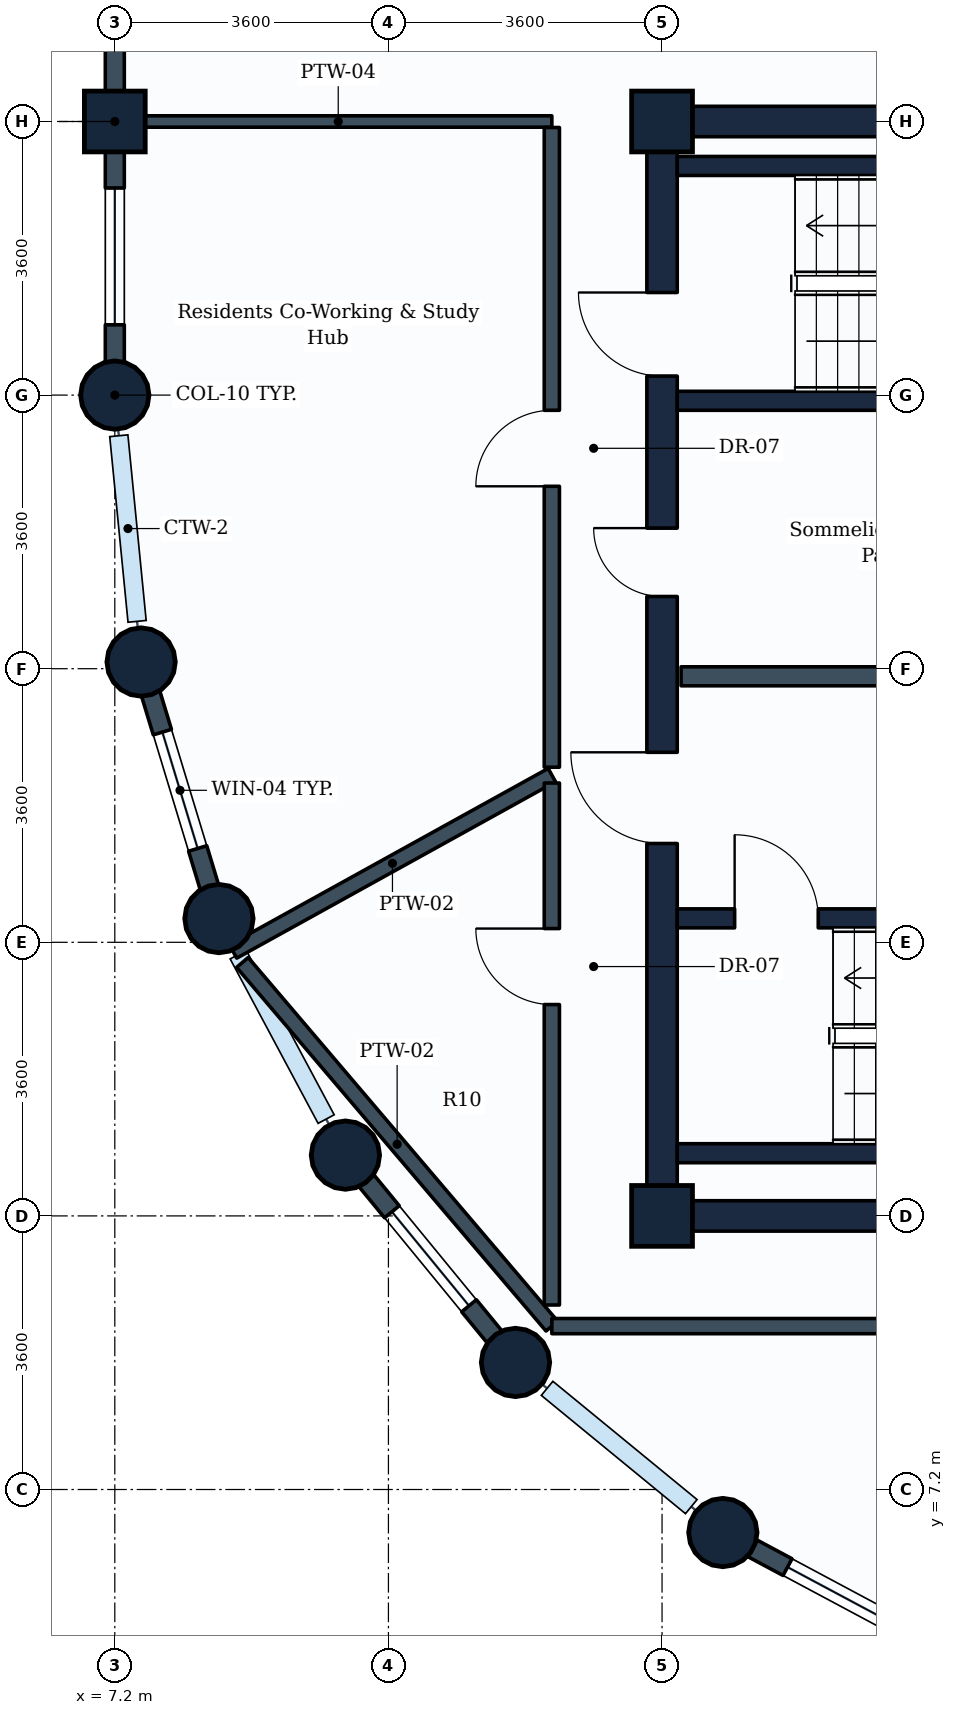
"""IFC4 building model, lengths in metres.
Left out: names, types, materials, properties, quantities, classifications, styles, units other than length and angle.
Written with IfcOpenShell. Run it as: python <this file> out.ifc"""

import sys

from ifc_helpers import new_model, si_unit, direction, frame, frame_2d, origin, origin_2d, place, context, subcontext, project, spatial, rectangle, circle, extrude, element, fill, save


model = new_model("IFC4")
c1 = context("Model", 3, precision=1e-05, world=origin(), true_north=direction((0.0, 1.0)))
c2 = subcontext(c1, "Body", "Model", "MODEL_VIEW")
j1 = project(units=[si_unit("LENGTHUNIT", "METRE"), si_unit("PLANEANGLEUNIT", "RADIAN")], contexts=[c1])
p1 = place(None, origin())
s1 = spatial("IfcSite", under=j1, at=p1, CompositionType="ELEMENT")
p2 = place(p1, origin())
s2 = spatial("IfcBuilding", under=s1, at=p2, CompositionType="ELEMENT")
p3 = place(p2, frame((0.0, 0.0, 273.8)))
s3 = spatial("IfcBuildingStorey", under=s2, at=p3, CompositionType="ELEMENT", Elevation=273.8)
p4 = place(p3, frame((7.2, 21.6, 0.0), z_axis=(0.0, 0.0, 1.0), x_axis=(1.0, 0.0, 0.0)))
e1 = element("IfcColumn", 1, at=p4, inside=s3, PredefinedType="COLUMN", context=c2, shape_type="SweptSolid", body=[
    extrude(circle(Radius=0.45, at=origin_2d()), origin(), (0.0, 0.0, 1.0), 3.6),
])
p5 = place(p3, frame((7.2, 25.2, 0.0), z_axis=(0.0, 0.0, 1.0), x_axis=(0.0, 1.0, 0.0)))
e2 = element("IfcColumn", 2, at=p5, inside=s3, PredefinedType="COLUMN", context=c2, shape_type="SweptSolid", body=[
    extrude(rectangle(XDim=0.8, YDim=0.8, at=origin_2d()), origin(), (0.0, 0.0, 1.0), 3.6),
])
for number, where, z_axis, x_axis in (
    (3, (7.546, 18.088, 0.0), (0.0, 0.0, 1.0), (1.0, 0.0, 0.0)),
    (4, (8.57, 14.712, 0.0), (0.0, 0.0, 1.0), (1.0, 0.0, 0.0)),
    (5, (10.234, 11.6, 0.0), (0.0, 0.0, 1.0), (1.0, 0.0, 0.0)),
    (6, (12.472, 8.872, 0.0), (0.0, 0.0, 1.0), (1.0, 0.0, 0.0)),
):
    element("IfcColumn", number, at=place(p3, frame(where, z_axis=z_axis, x_axis=x_axis)), inside=s3, PredefinedType="COLUMN", context=c2, shape_type="SweptSolid", body=[
        extrude(circle(Radius=0.45, at=origin_2d()), origin(), (0.0, 0.0, 1.0), 3.6),
    ])
for number, where, z_axis, x_axis in (
    (7, (14.4, 10.8, 0.0), (0.0, 0.0, 1.0), (1.0, 0.0, 0.0)),
    (8, (14.4, 25.2, 0.0), (0.0, 0.0, 1.0), (1.0, 0.0, 0.0)),
):
    element("IfcColumn", number, at=place(p3, frame(where, z_axis=z_axis, x_axis=x_axis)), inside=s3, PredefinedType="COLUMN", context=c2, shape_type="SweptSolid", body=[
        extrude(rectangle(XDim=0.8, YDim=0.8, at=origin_2d()), origin(), (0.0, 0.0, 1.0), 3.6),
    ])
p6 = place(p3, frame((15.2, 6.634, 0.0), z_axis=(0.0, 0.0, 1.0), x_axis=(1.0, 0.0, 0.0)))
e9 = element("IfcColumn", 9, at=p6, inside=s3, PredefinedType="COLUMN", context=c2, shape_type="SweptSolid", body=[
    extrude(circle(Radius=0.45, at=origin_2d()), origin(), (0.0, 0.0, 1.0), 3.6),
])
p7 = place(p3, frame((7.2, 25.2, 0.0), z_axis=(0.0, 0.0, 1.0), x_axis=(0.0, 1.0, 0.0)))
e10 = element("IfcWall", 10, at=p7, inside=s3, PredefinedType="STANDARD", context=c2, shape_type="SweptSolid", body=[
    extrude(rectangle(XDim=3.6, YDim=0.25, at=frame_2d((1.8, 0.0))), origin(), (0.0, 0.0, 1.0), 2.83),
])
p8 = place(p3, frame((7.2, 21.6, 0.0), z_axis=(0.0, 0.0, 1.0), x_axis=(0.0, 1.0, 0.0)))
e11 = element("IfcWall", 11, at=p8, inside=s3, PredefinedType="STANDARD", context=c2, shape_type="SweptSolid", body=[
    extrude(rectangle(XDim=3.6, YDim=0.25, at=frame_2d((1.8, 0.0))), origin(), (0.0, 0.0, 1.0), 2.83),
])
p9 = place(p8, frame((0.925, 0.0, 0.85)))
e12 = element("IfcOpeningElement", 12, at=p9, cuts=e11, PredefinedType="OPENING", context=c2, shape_type="SweptSolid", body=[
    extrude(rectangle(XDim=1.8, YDim=1.35, at=frame_2d((0.9, 0.675))), frame((0.0, 0.135, 0.0), z_axis=(0.0, -1.0, 0.0), x_axis=(1.0, 0.0, 0.0)), (0.0, 0.0, 1.0), 0.27),
])
p10 = place(p3, frame((8.57, 14.712, 0.0), z_axis=(0.0, 0.0, 1.0), x_axis=(-0.290305086481, 0.956934144423, 0.0)))
e13 = element("IfcWall", 13, at=p10, inside=s3, PredefinedType="STANDARD", context=c2, shape_type="SweptSolid", body=[
    extrude(rectangle(XDim=3.528, YDim=0.25, at=frame_2d((1.764, 0.0))), origin(), (0.0, 0.0, 1.0), 2.83),
])
p11 = place(p10, frame((0.964, 0.0, 0.85)))
e14 = element("IfcOpeningElement", 14, at=p11, cuts=e13, PredefinedType="OPENING", context=c2, shape_type="SweptSolid", body=[
    extrude(rectangle(XDim=1.6, YDim=1.35, at=frame_2d((0.8, 0.675))), frame((0.0, 0.135, 0.0), z_axis=(0.0, -1.0, 0.0), x_axis=(1.0, 0.0, 0.0)), (0.0, 0.0, 1.0), 0.27),
])
p12 = place(p3, frame((12.472, 8.872, 0.0), z_axis=(0.0, 0.0, 1.0), x_axis=(-0.634258295121, 0.773121216285, 0.0)))
e15 = element("IfcWall", 15, at=p12, inside=s3, PredefinedType="STANDARD", context=c2, shape_type="SweptSolid", body=[
    extrude(rectangle(XDim=3.529, YDim=0.25, at=frame_2d((1.764, 0.0))), origin(), (0.0, 0.0, 1.0), 2.83),
])
p13 = place(p12, frame((0.964, 0.0, 0.85)))
e16 = element("IfcOpeningElement", 16, at=p13, cuts=e15, PredefinedType="OPENING", context=c2, shape_type="SweptSolid", body=[
    extrude(rectangle(XDim=1.6, YDim=1.35, at=frame_2d((0.8, 0.675))), frame((0.0, 0.135, 0.0), z_axis=(0.0, -1.0, 0.0), x_axis=(1.0, 0.0, 0.0)), (0.0, 0.0, 1.0), 0.27),
])
p14 = place(p3, frame((18.312, 4.97, 0.0), z_axis=(0.0, 0.0, 1.0), x_axis=(-0.881846862014, 0.471535907389, 0.0)))
e17 = element("IfcWall", 17, at=p14, inside=s3, PredefinedType="STANDARD", context=c2, shape_type="SweptSolid", body=[
    extrude(rectangle(XDim=3.529, YDim=0.25, at=frame_2d((1.765, 0.0))), origin(), (0.0, 0.0, 1.0), 2.83),
])
p15 = place(p14, frame((0.964, 0.0, 0.85)))
e18 = element("IfcOpeningElement", 18, at=p15, cuts=e17, PredefinedType="OPENING", context=c2, shape_type="SweptSolid", body=[
    extrude(rectangle(XDim=1.6, YDim=1.35, at=frame_2d((0.8, 0.675))), frame((0.0, 0.135, 0.0), z_axis=(0.0, -1.0, 0.0), x_axis=(1.0, 0.0, 0.0)), (0.0, 0.0, 1.0), 0.27),
])
p16 = place(p3, frame((14.4, 10.8, 0.0), z_axis=(0.0, 0.0, 1.0), x_axis=(1.0, 0.0, 0.0)))
e19 = element("IfcWall", 19, at=p16, inside=s3, PredefinedType="SHEAR", context=c2, shape_type="SweptSolid", body=[
    extrude(rectangle(XDim=18.0, YDim=0.4, at=frame_2d((9.0, 0.0))), origin(), (0.0, 0.0, 1.0), 3.35),
])
p17 = place(p3, frame((14.4, 25.2, 0.0), z_axis=(0.0, 0.0, 1.0), x_axis=(1.0, 0.0, 0.0)))
e20 = element("IfcWall", 20, at=p17, inside=s3, PredefinedType="SHEAR", context=c2, shape_type="SweptSolid", body=[
    extrude(rectangle(XDim=10.8, YDim=0.4, at=frame_2d((5.4, 0.0))), origin(), (0.0, 0.0, 1.0), 3.35),
])
p18 = place(p3, frame((14.4, 10.8, 0.0), z_axis=(0.0, 0.0, 1.0), x_axis=(0.0, 1.0, 0.0)))
e21 = element("IfcWall", 21, at=p18, inside=s3, PredefinedType="SHEAR", context=c2, shape_type="SweptSolid", body=[
    extrude(rectangle(XDim=14.4, YDim=0.4, at=frame_2d((7.2, 0.0))), origin(), (0.0, 0.0, 1.0), 3.35),
])
p19 = place(p18, frame((11.05, 0.0, 0.0)))
e22 = element("IfcOpeningElement", 22, at=p19, cuts=e21, PredefinedType="OPENING", context=c2, shape_type="SweptSolid", body=[
    extrude(rectangle(XDim=1.1, YDim=2.1, at=frame_2d((0.55, 1.05))), frame((0.0, 0.21, 0.0), z_axis=(0.0, -1.0, 0.0), x_axis=(1.0, 0.0, 0.0)), (0.0, 0.0, 1.0), 0.42),
])
p20 = place(p18, frame((4.9, 0.0, 0.0)))
e23 = element("IfcOpeningElement", 23, at=p20, cuts=e21, PredefinedType="OPENING", context=c2, shape_type="SweptSolid", body=[
    extrude(rectangle(XDim=1.2, YDim=2.1, at=frame_2d((0.6, 1.05))), frame((0.0, 0.21, 0.0), z_axis=(0.0, -1.0, 0.0), x_axis=(1.0, 0.0, 0.0)), (0.0, 0.0, 1.0), 0.42),
])
p21 = place(p18, frame((8.15, 0.0, 0.0)))
e24 = element("IfcOpeningElement", 24, at=p21, cuts=e21, PredefinedType="OPENING", context=c2, shape_type="SweptSolid", body=[
    extrude(rectangle(XDim=0.9, YDim=2.1, at=frame_2d((0.45, 1.05))), frame((0.0, 0.21, 0.0), z_axis=(0.0, -1.0, 0.0), x_axis=(1.0, 0.0, 0.0)), (0.0, 0.0, 1.0), 0.42),
])
p22 = place(p3, frame((14.6, 11.625, 0.0), z_axis=(0.0, 0.0, 1.0), x_axis=(1.0, 0.0, 0.0)))
e25 = element("IfcWall", 25, at=p22, inside=s3, PredefinedType="SHEAR", context=c2, shape_type="SweptSolid", body=[
    extrude(rectangle(XDim=8.75, YDim=0.25, at=frame_2d((4.375, 0.0))), origin(), (0.0, 0.0, 1.0), 3.35),
])
p23 = place(p3, frame((14.6, 14.715, 0.0), z_axis=(0.0, 0.0, 1.0), x_axis=(1.0, 0.0, 0.0)))
e26 = element("IfcWall", 26, at=p23, inside=s3, PredefinedType="SHEAR", context=c2, shape_type="SweptSolid", body=[
    extrude(rectangle(XDim=8.75, YDim=0.25, at=frame_2d((4.375, 0.0))), origin(), (0.0, 0.0, 1.0), 3.35),
])
p24 = place(p23, frame((0.755, 0.0, 0.0)))
e27 = element("IfcOpeningElement", 27, at=p24, cuts=e26, PredefinedType="OPENING", context=c2, shape_type="SweptSolid", body=[
    extrude(rectangle(XDim=1.1, YDim=2.1, at=frame_2d((0.55, 1.05))), frame((0.0, 0.135, 0.0), z_axis=(0.0, -1.0, 0.0), x_axis=(1.0, 0.0, 0.0)), (0.0, 0.0, 1.0), 0.27),
])
for number, where, z_axis, x_axis in (
    (28, (14.6, 21.525, 0.0), (0.0, 0.0, 1.0), (1.0, 0.0, 0.0)),
    (29, (14.6, 24.615, 0.0), (0.0, 0.0, 1.0), (1.0, 0.0, 0.0)),
):
    element("IfcWall", number, at=place(p3, frame(where, z_axis=z_axis, x_axis=x_axis)), inside=s3, PredefinedType="SHEAR", context=c2, shape_type="SweptSolid", body=[
        extrude(rectangle(XDim=8.3, YDim=0.25, at=frame_2d((4.15, 0.0))), origin(), (0.0, 0.0, 1.0), 3.35),
    ])
p25 = place(p3, frame((14.65, 17.9, 0.0), z_axis=(0.0, 0.0, 1.0), x_axis=(1.0, 0.0, 0.0)))
e30 = element("IfcWall", 30, at=p25, inside=s3, PredefinedType="PARTITIONING", context=c2, shape_type="SweptSolid", body=[
    extrude(rectangle(XDim=7.15, YDim=0.25, at=frame_2d((3.575, 0.0))), origin(), (0.0, 0.0, 1.0), 3.335),
])
p26 = place(p3, frame((7.329, 25.2, 0.0), z_axis=(0.0, 0.0, 1.0), x_axis=(1.0, 0.0, 0.0)))
e31 = element("IfcWall", 31, at=p26, inside=s3, PredefinedType="PARTITIONING", context=c2, shape_type="SweptSolid", body=[
    extrude(rectangle(XDim=5.621, YDim=0.15, at=frame_2d((2.811, 0.0))), origin(), (0.0, 0.0, 1.0), 3.335),
])
p27 = place(p3, frame((12.95, 9.35, 0.0), z_axis=(0.0, 0.0, 1.0), x_axis=(-0.648005936971, 0.76163528388, 0.0)))
e32 = element("IfcWall", 32, at=p27, inside=s3, PredefinedType="PARTITIONING", context=c2, shape_type="SweptSolid", body=[
    extrude(rectangle(XDim=6.282, YDim=0.2, at=frame_2d((3.141, 0.0))), origin(), (0.0, 0.0, 1.0), 2.83),
])
p28 = place(p3, frame((12.95, 16.6, 0.0), z_axis=(0.0, 0.0, 1.0), x_axis=(-0.874941762978, -0.484228160475, 0.0)))
e33 = element("IfcWall", 33, at=p28, inside=s3, PredefinedType="PARTITIONING", context=c2, shape_type="SweptSolid", body=[
    extrude(rectangle(XDim=4.793, YDim=0.2, at=frame_2d((2.396, 0.0))), origin(), (0.0, 0.0, 1.0), 2.83),
])
p29 = place(p3, frame((12.95, 16.704, 0.0), z_axis=(0.0, 0.0, 1.0), x_axis=(0.0, 1.0, 0.0)))
e34 = element("IfcWall", 34, at=p29, inside=s3, PredefinedType="PARTITIONING", context=c2, shape_type="SweptSolid", body=[
    extrude(rectangle(XDim=8.417, YDim=0.2, at=frame_2d((4.208, 0.0))), origin(), (0.0, 0.0, 1.0), 3.02),
])
p30 = place(p29, frame((3.696, 0.0, 0.0)))
e35 = element("IfcOpeningElement", 35, at=p30, cuts=e34, PredefinedType="OPENING", context=c2, shape_type="SweptSolid", body=[
    extrude(rectangle(XDim=1.0, YDim=2.1, at=frame_2d((0.5, 1.05))), frame((0.0, 0.11, 0.0), z_axis=(0.0, -1.0, 0.0), x_axis=(1.0, 0.0, 0.0)), (0.0, 0.0, 1.0), 0.22),
])
p31 = place(p3, frame((12.95, 9.628, 0.0), z_axis=(0.0, 0.0, 1.0), x_axis=(0.0, 1.0, 0.0)))
e36 = element("IfcWall", 36, at=p31, inside=s3, PredefinedType="PARTITIONING", context=c2, shape_type="SweptSolid", body=[
    extrude(rectangle(XDim=6.868, YDim=0.2, at=frame_2d((3.434, 0.0))), origin(), (0.0, 0.0, 1.0), 3.03),
])
p32 = place(p31, frame((3.953, 0.0, 0.0)))
e37 = element("IfcOpeningElement", 37, at=p32, cuts=e36, PredefinedType="OPENING", context=c2, shape_type="SweptSolid", body=[
    extrude(rectangle(XDim=1.0, YDim=2.1, at=frame_2d((0.5, 1.05))), frame((0.0, 0.11, 0.0), z_axis=(0.0, -1.0, 0.0), x_axis=(1.0, 0.0, 0.0)), (0.0, 0.0, 1.0), 0.22),
])
p33 = place(p3, frame((12.95, 9.35, 0.0), z_axis=(0.0, 0.0, 1.0), x_axis=(1.0, 0.0, 0.0)))
e38 = element("IfcWall", 38, at=p33, inside=s3, PredefinedType="PARTITIONING", context=c2, shape_type="SweptSolid", body=[
    extrude(rectangle(XDim=15.771, YDim=0.2, at=frame_2d((7.885, 0.0))), origin(), (0.0, 0.0, 1.0), 3.02),
])
p34 = place(p33, frame((4.836, 0.0, 0.0)))
e39 = element("IfcOpeningElement", 39, at=p34, cuts=e38, PredefinedType="OPENING", context=c2, shape_type="SweptSolid", body=[
    extrude(rectangle(XDim=1.0, YDim=2.1, at=frame_2d((0.5, 1.05))), frame((0.0, 0.11, 0.0), z_axis=(0.0, -1.0, 0.0), x_axis=(1.0, 0.0, 0.0)), (0.0, 0.0, 1.0), 0.22),
])
p35 = place(p9, origin())
e40 = element("IfcWindow", 40, at=p35, inside=s3, PartitioningType="SINGLE_PANEL", PredefinedType="WINDOW", context=c2, shape_type="SweptSolid", body=[
    extrude(rectangle(XDim=1.8, YDim=1.35, at=frame_2d((0.9, 0.675))), frame((0.0, 0.03, 0.0), z_axis=(0.0, -1.0, 0.0), x_axis=(1.0, 0.0, 0.0)), (0.0, 0.0, 1.0), 0.06),
])
fill(e12, e40)
p36 = place(p11, origin())
e41 = element("IfcWindow", 41, at=p36, inside=s3, PartitioningType="SINGLE_PANEL", PredefinedType="WINDOW", context=c2, shape_type="SweptSolid", body=[
    extrude(rectangle(XDim=1.6, YDim=1.35, at=frame_2d((0.8, 0.675))), frame((0.0, 0.03, 0.0), z_axis=(0.0, -1.0, 0.0), x_axis=(1.0, 0.0, 0.0)), (0.0, 0.0, 1.0), 0.06),
])
fill(e14, e41)
p37 = place(p13, origin())
e42 = element("IfcWindow", 42, at=p37, inside=s3, PartitioningType="SINGLE_PANEL", PredefinedType="WINDOW", context=c2, shape_type="SweptSolid", body=[
    extrude(rectangle(XDim=1.6, YDim=1.35, at=frame_2d((0.8, 0.675))), frame((0.0, 0.03, 0.0), z_axis=(0.0, -1.0, 0.0), x_axis=(1.0, 0.0, 0.0)), (0.0, 0.0, 1.0), 0.06),
])
fill(e16, e42)
p38 = place(p15, origin())
e43 = element("IfcWindow", 43, at=p38, inside=s3, PartitioningType="SINGLE_PANEL", PredefinedType="WINDOW", context=c2, shape_type="SweptSolid", body=[
    extrude(rectangle(XDim=1.6, YDim=1.35, at=frame_2d((0.8, 0.675))), frame((0.0, 0.03, 0.0), z_axis=(0.0, -1.0, 0.0), x_axis=(1.0, 0.0, 0.0)), (0.0, 0.0, 1.0), 0.06),
])
fill(e18, e43)
p39 = place(p24, origin())
e44 = element("IfcDoor", 44, at=p39, inside=s3, OperationType="SINGLE_SWING_LEFT", PredefinedType="DOOR", context=c2, shape_type="SweptSolid", body=[
    extrude(rectangle(XDim=1.1, YDim=2.1, at=frame_2d((0.55, 1.05))), frame((0.0, 0.025, 0.0), z_axis=(0.0, -1.0, 0.0), x_axis=(1.0, 0.0, 0.0)), (0.0, 0.0, 1.0), 0.05),
])
fill(e27, e44)
p40 = place(p19, origin())
e45 = element("IfcDoor", 45, at=p40, inside=s3, OperationType="SINGLE_SWING_RIGHT", PredefinedType="DOOR", context=c2, shape_type="SweptSolid", body=[
    extrude(rectangle(XDim=1.1, YDim=2.1, at=frame_2d((0.55, 1.05))), frame((0.0, 0.025, 0.0), z_axis=(0.0, -1.0, 0.0), x_axis=(1.0, 0.0, 0.0)), (0.0, 0.0, 1.0), 0.05),
])
fill(e22, e45)
p41 = place(p20, origin())
e46 = element("IfcDoor", 46, at=p41, inside=s3, OperationType="SINGLE_SWING_RIGHT", PredefinedType="DOOR", context=c2, shape_type="SweptSolid", body=[
    extrude(rectangle(XDim=1.2, YDim=2.1, at=frame_2d((0.6, 1.05))), frame((0.0, 0.025, 0.0), z_axis=(0.0, -1.0, 0.0), x_axis=(1.0, 0.0, 0.0)), (0.0, 0.0, 1.0), 0.05),
])
fill(e23, e46)
p42 = place(p21, origin())
e47 = element("IfcDoor", 47, at=p42, inside=s3, OperationType="SINGLE_SWING_RIGHT", PredefinedType="DOOR", context=c2, shape_type="SweptSolid", body=[
    extrude(rectangle(XDim=0.9, YDim=2.1, at=frame_2d((0.45, 1.05))), frame((0.0, 0.025, 0.0), z_axis=(0.0, -1.0, 0.0), x_axis=(1.0, 0.0, 0.0)), (0.0, 0.0, 1.0), 0.05),
])
fill(e24, e47)
p43 = place(p30, origin())
e48 = element("IfcDoor", 48, at=p43, inside=s3, OperationType="SINGLE_SWING_LEFT", PredefinedType="DOOR", context=c2, shape_type="SweptSolid", body=[
    extrude(rectangle(XDim=1.0, YDim=2.1, at=frame_2d((0.5, 1.05))), frame((0.0, 0.025, 0.0), z_axis=(0.0, -1.0, 0.0), x_axis=(1.0, 0.0, 0.0)), (0.0, 0.0, 1.0), 0.05),
])
fill(e35, e48)
p44 = place(p32, origin())
e49 = element("IfcDoor", 49, at=p44, inside=s3, OperationType="SINGLE_SWING_RIGHT", PredefinedType="DOOR", context=c2, shape_type="SweptSolid", body=[
    extrude(rectangle(XDim=1.0, YDim=2.1, at=frame_2d((0.5, 1.05))), frame((0.0, 0.025, 0.0), z_axis=(0.0, -1.0, 0.0), x_axis=(1.0, 0.0, 0.0)), (0.0, 0.0, 1.0), 0.05),
])
fill(e37, e49)
save(model, sys.argv[1])
